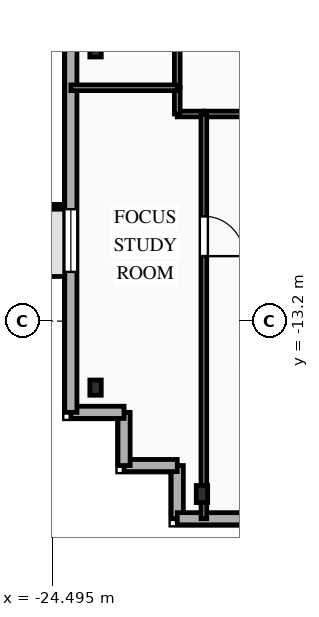
"""IFC4 building model, lengths in metres.
Left out: names, types, materials, properties, quantities, classifications, styles, units other than length and angle.
Written with IfcOpenShell. Run it as: python <this file> out.ifc"""

import sys

from ifc_helpers import new_model, si_unit, direction, frame, frame_2d, origin, origin_2d, place, context, subcontext, project, spatial, rectangle, i_section, extrude, element, fill, save


model = new_model("IFC4")
c1 = context("Model", 3, precision=1e-05, world=origin(), true_north=direction((0.0, 1.0)))
c2 = subcontext(c1, "Body", "Model", "MODEL_VIEW")
j1 = project(units=[si_unit("LENGTHUNIT", "METRE"), si_unit("PLANEANGLEUNIT", "RADIAN")], contexts=[c1])
p1 = place(None, origin())
s1 = spatial("IfcSite", under=j1, at=p1, CompositionType="ELEMENT")
p2 = place(p1, origin())
s2 = spatial("IfcBuilding", under=s1, at=p2, CompositionType="ELEMENT")
p3 = place(p2, frame((0.0, 0.0, 258.45)))
s3 = spatial("IfcBuildingStorey", under=s2, at=p3, CompositionType="ELEMENT", Elevation=258.45)
p4 = place(p3, frame((-20.55, -17.75, 0.0), z_axis=(0.0, 0.0, 1.0), x_axis=(1.0, 0.0, 0.0)))
e1 = element("IfcColumn", 1, at=p4, inside=s3, PredefinedType="COLUMN", context=c2, shape_type="SweptSolid", body=[
    extrude(i_section(OverallWidth=0.3, OverallDepth=0.45, WebThickness=0.014, FlangeThickness=0.026, FilletRadius=0.027, at=origin_2d()), origin(), (0.0, 0.0, 1.0), 3.35),
])
for number, where, z_axis, x_axis in (
    (2, (-23.35, -6.05, 0.0), (0.0, 0.0, 1.0), (1.0, 0.0, 0.0)),
    (3, (-23.35, -14.95, 0.0), (0.0, 0.0, 1.0), (1.0, 0.0, 0.0)),
):
    element("IfcColumn", number, at=place(p3, frame(where, z_axis=z_axis, x_axis=x_axis)), inside=s3, PredefinedType="COLUMN", context=c2, shape_type="SweptSolid", body=[
        extrude(i_section(OverallWidth=0.3, OverallDepth=0.4, WebThickness=0.013, FlangeThickness=0.024, FilletRadius=0.027, at=origin_2d()), origin(), (0.0, 0.0, 1.0), 3.35),
    ])
p5 = place(p3, frame((-21.2, -18.4, 0.0), z_axis=(0.0, 0.0, 1.0), x_axis=(0.0, 1.0, 0.0)))
e4 = element("IfcWall", 4, at=p5, inside=s3, PredefinedType="SOLIDWALL", context=c2, shape_type="SweptSolid", body=[
    extrude(rectangle(XDim=1.4, YDim=0.32, at=frame_2d((0.7, 0.0))), origin(), (0.0, 0.0, 1.0), 3.03),
])
p6 = place(p3, frame((-21.2, -17.0, 0.0), z_axis=(0.0, 0.0, 1.0), x_axis=(-1.0, 0.0, 0.0)))
e5 = element("IfcWall", 5, at=p6, inside=s3, PredefinedType="SOLIDWALL", context=c2, shape_type="SweptSolid", body=[
    extrude(rectangle(XDim=1.4, YDim=0.32, at=frame_2d((0.7, 0.0))), origin(), (0.0, 0.0, 1.0), 3.03),
])
for number, where, z_axis, x_axis in (
    (6, (-22.6, -17.0, 0.0), (0.0, 0.0, 1.0), (0.0, 1.0, 0.0)),
    (7, (-22.6, -15.6, 0.0), (0.0, 0.0, 1.0), (-1.0, 0.0, 0.0)),
):
    element("IfcWall", number, at=place(p3, frame(where, z_axis=z_axis, x_axis=x_axis)), inside=s3, PredefinedType="SOLIDWALL", context=c2, shape_type="SweptSolid", body=[
        extrude(rectangle(XDim=1.4, YDim=0.32, at=frame_2d((0.7, 0.0))), origin(), (0.0, 0.0, 1.0), 3.03),
    ])
p7 = place(p3, frame((-24.0, -15.6, 0.0), z_axis=(0.0, 0.0, 1.0), x_axis=(0.0, 1.0, 0.0)))
e8 = element("IfcWall", 8, at=p7, inside=s3, PredefinedType="SOLIDWALL", context=c2, shape_type="SweptSolid", body=[
    extrude(rectangle(XDim=28.0, YDim=0.32, at=frame_2d((14.0, 0.0))), origin(), (0.0, 0.0, 1.0), 3.03),
])
p8 = place(p7, frame((3.695, 0.0, 0.85)))
e9 = element("IfcOpeningElement", 9, at=p8, cuts=e8, PredefinedType="OPENING", context=c2, shape_type="SweptSolid", body=[
    extrude(rectangle(XDim=1.65, YDim=1.85, at=frame_2d((0.825, 0.925))), frame((0.0, 0.17, 0.0), z_axis=(0.0, -1.0, 0.0), x_axis=(1.0, 0.0, 0.0)), (0.0, 0.0, 1.0), 0.34),
])
p9 = place(p7, frame((13.215, 0.0, 0.85)))
e10 = element("IfcOpeningElement", 10, at=p9, cuts=e8, PredefinedType="OPENING", context=c2, shape_type="SweptSolid", body=[
    extrude(rectangle(XDim=1.65, YDim=1.85, at=frame_2d((0.825, 0.925))), frame((0.0, 0.17, 0.0), z_axis=(0.0, -1.0, 0.0), x_axis=(1.0, 0.0, 0.0)), (0.0, 0.0, 1.0), 0.34),
])
p10 = place(p7, frame((22.735, 0.0, 0.85)))
e11 = element("IfcOpeningElement", 11, at=p10, cuts=e8, PredefinedType="OPENING", context=c2, shape_type="SweptSolid", body=[
    extrude(rectangle(XDim=1.65, YDim=1.85, at=frame_2d((0.825, 0.925))), frame((0.0, 0.17, 0.0), z_axis=(0.0, -1.0, 0.0), x_axis=(1.0, 0.0, 0.0)), (0.0, 0.0, 1.0), 0.34),
])
p11 = place(p3, frame((20.8, -18.4, 0.0), z_axis=(0.0, 0.0, 1.0), x_axis=(-1.0, 0.0, 0.0)))
e12 = element("IfcWall", 12, at=p11, inside=s3, PredefinedType="SOLIDWALL", context=c2, shape_type="SweptSolid", body=[
    extrude(rectangle(XDim=42.0, YDim=0.32, at=frame_2d((21.0, 0.0))), origin(), (0.0, 0.0, 1.0), 3.03),
])
p12 = place(p11, frame((2.015, 0.0, 0.85)))
e13 = element("IfcOpeningElement", 13, at=p12, cuts=e12, PredefinedType="OPENING", context=c2, shape_type="SweptSolid", body=[
    extrude(rectangle(XDim=1.65, YDim=1.85, at=frame_2d((0.825, 0.925))), frame((0.0, 0.17, 0.0), z_axis=(0.0, -1.0, 0.0), x_axis=(1.0, 0.0, 0.0)), (0.0, 0.0, 1.0), 0.34),
])
p13 = place(p11, frame((6.815, 0.0, 0.85)))
e14 = element("IfcOpeningElement", 14, at=p13, cuts=e12, PredefinedType="OPENING", context=c2, shape_type="SweptSolid", body=[
    extrude(rectangle(XDim=1.65, YDim=1.85, at=frame_2d((0.825, 0.925))), frame((0.0, 0.17, 0.0), z_axis=(0.0, -1.0, 0.0), x_axis=(1.0, 0.0, 0.0)), (0.0, 0.0, 1.0), 0.34),
])
p14 = place(p11, frame((14.1, 0.0, 0.85)))
e15 = element("IfcOpeningElement", 15, at=p14, cuts=e12, PredefinedType="OPENING", context=c2, shape_type="SweptSolid", body=[
    extrude(rectangle(XDim=2.2, YDim=1.85, at=frame_2d((1.1, 0.925))), frame((0.0, 0.17, 0.0), z_axis=(0.0, -1.0, 0.0), x_axis=(1.0, 0.0, 0.0)), (0.0, 0.0, 1.0), 0.34),
])
p15 = place(p11, frame((24.34, 0.0, 0.85)))
e16 = element("IfcOpeningElement", 16, at=p15, cuts=e12, PredefinedType="OPENING", context=c2, shape_type="SweptSolid", body=[
    extrude(rectangle(XDim=2.2, YDim=1.85, at=frame_2d((1.1, 0.925))), frame((0.0, 0.17, 0.0), z_axis=(0.0, -1.0, 0.0), x_axis=(1.0, 0.0, 0.0)), (0.0, 0.0, 1.0), 0.34),
])
p16 = place(p11, frame((32.455, 0.0, 0.85)))
e17 = element("IfcOpeningElement", 17, at=p16, cuts=e12, PredefinedType="OPENING", context=c2, shape_type="SweptSolid", body=[
    extrude(rectangle(XDim=1.65, YDim=1.85, at=frame_2d((0.825, 0.925))), frame((0.0, 0.17, 0.0), z_axis=(0.0, -1.0, 0.0), x_axis=(1.0, 0.0, 0.0)), (0.0, 0.0, 1.0), 0.34),
])
p17 = place(p11, frame((37.855, 0.0, 0.85)))
e18 = element("IfcOpeningElement", 18, at=p17, cuts=e12, PredefinedType="OPENING", context=c2, shape_type="SweptSolid", body=[
    extrude(rectangle(XDim=1.65, YDim=1.85, at=frame_2d((0.825, 0.925))), frame((0.0, 0.17, 0.0), z_axis=(0.0, -1.0, 0.0), x_axis=(1.0, 0.0, 0.0)), (0.0, 0.0, 1.0), 0.34),
])
p18 = place(p3, frame((-20.5, -7.75, 0.0), z_axis=(0.0, 0.0, 1.0), x_axis=(-1.0, 0.0, 0.0)))
e19 = element("IfcWall", 19, at=p18, inside=s3, PredefinedType="PARTITIONING", context=c2, shape_type="SweptSolid", body=[
    extrude(rectangle(XDim=0.7, YDim=0.15, at=frame_2d((0.35, 0.0))), origin(), (0.0, 0.0, 1.0), 3.03),
])
p19 = place(p3, frame((-21.2, -7.75, 0.0), z_axis=(0.0, 0.0, 1.0), x_axis=(0.0, 1.0, 0.0)))
e20 = element("IfcWall", 20, at=p19, inside=s3, PredefinedType="PARTITIONING", context=c2, shape_type="SweptSolid", body=[
    extrude(rectangle(XDim=0.69, YDim=0.15, at=frame_2d((0.345, 0.0))), origin(), (0.0, 0.0, 1.0), 2.685),
])
p20 = place(p3, frame((-21.2, -7.06, 0.0), z_axis=(0.0, 0.0, 1.0), x_axis=(0.0, 1.0, 0.0)))
e21 = element("IfcWall", 21, at=p20, inside=s3, PredefinedType="PARTITIONING", context=c2, shape_type="SweptSolid", body=[
    extrude(rectangle(XDim=1.46, YDim=0.15, at=frame_2d((0.73, 0.0))), origin(), (0.0, 0.0, 1.0), 2.685),
])
p21 = place(p3, frame((-15.125, -7.75, 0.0), z_axis=(0.0, 0.0, 1.0), x_axis=(-1.0, 0.0, 0.0)))
e22 = element("IfcWall", 22, at=p21, inside=s3, PredefinedType="PARTITIONING", context=c2, shape_type="SweptSolid", body=[
    extrude(rectangle(XDim=5.375, YDim=0.15, at=frame_2d((2.688, 0.0))), origin(), (0.0, 0.0, 1.0), 3.03),
])
p22 = place(p21, frame((0.976, 0.0, 0.0)))
e23 = element("IfcOpeningElement", 23, at=p22, cuts=e22, PredefinedType="OPENING", context=c2, shape_type="SweptSolid", body=[
    extrude(rectangle(XDim=1.05, YDim=2.15, at=frame_2d((0.525, 1.075))), frame((0.0, 0.085, 0.0), z_axis=(0.0, -1.0, 0.0), x_axis=(1.0, 0.0, 0.0)), (0.0, 0.0, 1.0), 0.17),
])
p23 = place(p3, frame((-24.0, -7.06, 0.0), z_axis=(0.0, 0.0, 1.0), x_axis=(1.0, 0.0, 0.0)))
e24 = element("IfcWall", 24, at=p23, inside=s3, PredefinedType="PARTITIONING", context=c2, shape_type="SweptSolid", body=[
    extrude(rectangle(XDim=2.8, YDim=0.15, at=frame_2d((1.4, 0.0))), origin(), (0.0, 0.0, 1.0), 3.03),
])
p24 = place(p3, frame((-20.5, -7.75, 0.0), z_axis=(0.0, 0.0, 1.0), x_axis=(0.0, -1.0, 0.0)))
e25 = element("IfcWall", 25, at=p24, inside=s3, PredefinedType="PARTITIONING", context=c2, shape_type="SweptSolid", body=[
    extrude(rectangle(XDim=10.65, YDim=0.15, at=frame_2d((5.325, 0.0))), origin(), (0.0, 0.0, 1.0), 2.655),
])
p25 = place(p24, frame((2.69, 0.0, 0.0)))
e26 = element("IfcOpeningElement", 26, at=p25, cuts=e25, PredefinedType="OPENING", context=c2, shape_type="SweptSolid", body=[
    extrude(rectangle(XDim=1.05, YDim=2.15, at=frame_2d((0.525, 1.075))), frame((0.0, 0.085, 0.0), z_axis=(0.0, -1.0, 0.0), x_axis=(1.0, 0.0, 0.0)), (0.0, 0.0, 1.0), 0.17),
])
p26 = place(p8, origin())
e27 = element("IfcWindow", 27, at=p26, inside=s3, PartitioningType="SINGLE_PANEL", PredefinedType="WINDOW", context=c2, shape_type="SweptSolid", body=[
    extrude(rectangle(XDim=1.65, YDim=1.85, at=frame_2d((0.825, 0.925))), frame((0.0, 0.03, 0.0), z_axis=(0.0, -1.0, 0.0), x_axis=(1.0, 0.0, 0.0)), (0.0, 0.0, 1.0), 0.06),
])
fill(e9, e27)
p27 = place(p25, origin())
e28 = element("IfcDoor", 28, at=p27, inside=s3, OperationType="SINGLE_SWING_RIGHT", PredefinedType="DOOR", context=c2, shape_type="SweptSolid", body=[
    extrude(rectangle(XDim=1.05, YDim=2.15, at=frame_2d((0.525, 1.075))), frame((0.0, 0.025, 0.0), z_axis=(0.0, -1.0, 0.0), x_axis=(1.0, 0.0, 0.0)), (0.0, 0.0, 1.0), 0.05),
])
fill(e26, e28)
save(model, sys.argv[1])
